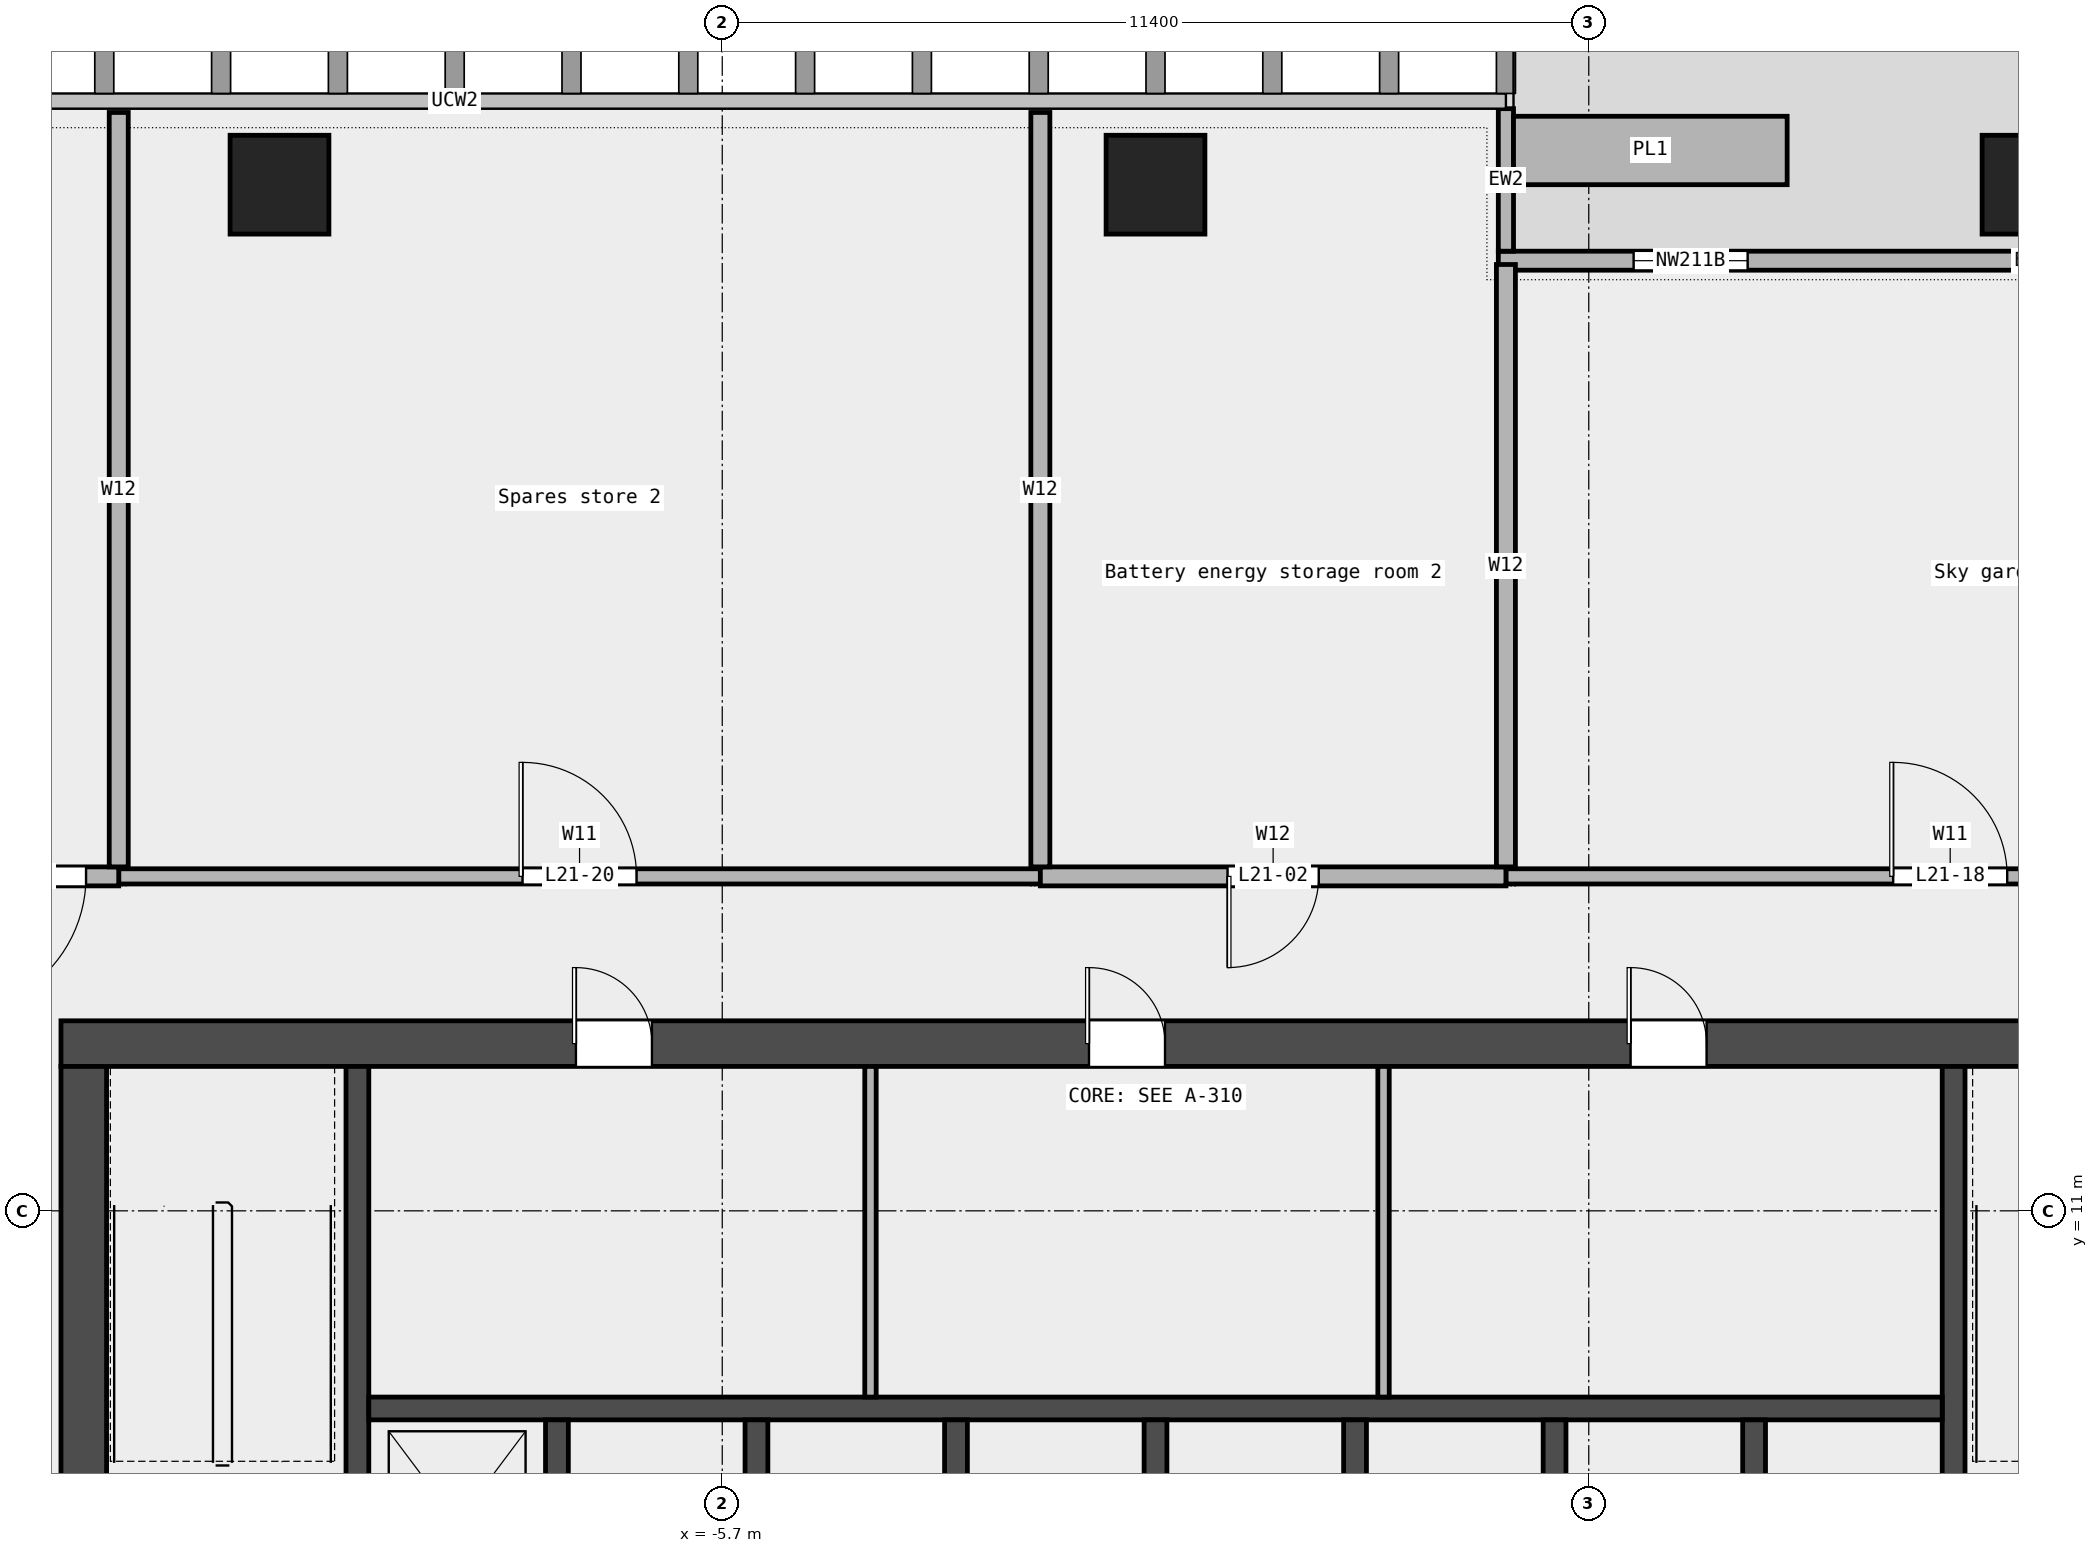
"""IFC4 building model, lengths in metres.
Left out: names, types, materials, properties, quantities, classifications, styles, units other than length and angle.
Written with IfcOpenShell. Run it as: python <this file> out.ifc"""

import sys

from ifc_helpers import new_model, si_unit, direction, frame, frame_2d, origin, origin_2d, place, context, subcontext, project, spatial, rectangle, extrude, element, fill, save


model = new_model("IFC4")
c1 = context("Model", 3, precision=1e-05, world=origin(), true_north=direction((0.0, 1.0)))
c2 = subcontext(c1, "Body", "Model", "MODEL_VIEW")
j1 = project(units=[si_unit("LENGTHUNIT", "METRE"), si_unit("PLANEANGLEUNIT", "RADIAN")], contexts=[c1])
p1 = place(None, origin())
s1 = spatial("IfcSite", under=j1, at=p1, CompositionType="ELEMENT")
p2 = place(p1, origin())
s2 = spatial("IfcBuilding", under=s1, at=p2, CompositionType="ELEMENT")
p3 = place(p2, frame((0.0, 0.0, 108.1)))
s3 = spatial("IfcBuildingStorey", under=s2, at=p3, CompositionType="ELEMENT", Elevation=108.1)
for number, where, z_axis, x_axis in (
    (1, (11.525, 24.5, 0.0), (0.0, 0.0, 1.0), (1.0, 0.0, 0.0)),
    (2, (0.0, 24.5, 0.0), (0.0, 0.0, 1.0), (1.0, 0.0, 0.0)),
    (3, (-11.525, 24.5, 0.0), (0.0, 0.0, 1.0), (1.0, 0.0, 0.0)),
):
    element("IfcColumn", number, at=place(p3, frame(where, z_axis=z_axis, x_axis=x_axis)), inside=s3, PredefinedType="COLUMN", context=c2, shape_type="SweptSolid", body=[
        extrude(rectangle(XDim=1.3, YDim=1.3, at=origin_2d()), origin(), (0.0, 0.0, 1.0), 4.05),
    ])
p4 = place(p3, frame((18.54, 23.5, 0.0), z_axis=(0.0, 0.0, 1.0), x_axis=(-1.0, 0.0, 0.0)))
e4 = element("IfcWall", 4, at=p4, inside=s3, PredefinedType="STANDARD", context=c2, shape_type="SweptSolid", body=[
    extrude(rectangle(XDim=14.03, YDim=0.25, at=frame_2d((7.015, 0.0))), origin(), (0.0, 0.0, 1.0), 4.05),
])
p5 = place(p4, frame((1.75, 0.0, 0.45)))
e5 = element("IfcOpeningElement", 5, at=p5, cuts=e4, PredefinedType="OPENING", context=c2, shape_type="SweptSolid", body=[
    extrude(rectangle(XDim=1.5, YDim=3.0, at=frame_2d((0.75, 1.5))), frame((0.0, 0.137, 0.0), z_axis=(0.0, -1.0, 0.0), x_axis=(1.0, 0.0, 0.0)), (0.0, 0.0, 1.0), 0.274),
])
p6 = place(p4, frame((4.25, 0.0, 0.0)))
e6 = element("IfcOpeningElement", 6, at=p6, cuts=e4, PredefinedType="OPENING", context=c2, shape_type="SweptSolid", body=[
    extrude(rectangle(XDim=1.8, YDim=2.4, at=frame_2d((0.9, 1.2))), frame((0.0, 0.137, 0.0), z_axis=(0.0, -1.0, 0.0), x_axis=(1.0, 0.0, 0.0)), (0.0, 0.0, 1.0), 0.274),
])
p7 = place(p4, frame((10.75, 0.0, 0.45)))
e7 = element("IfcOpeningElement", 7, at=p7, cuts=e4, PredefinedType="OPENING", context=c2, shape_type="SweptSolid", body=[
    extrude(rectangle(XDim=1.5, YDim=3.0, at=frame_2d((0.75, 1.5))), frame((0.0, 0.137, 0.0), z_axis=(0.0, -1.0, 0.0), x_axis=(1.0, 0.0, 0.0)), (0.0, 0.0, 1.0), 0.274),
])
p8 = place(p3, frame((4.61, 25.5, 0.0), z_axis=(0.0, 0.0, 1.0), x_axis=(0.0, -1.0, 0.0)))
e8 = element("IfcWall", 8, at=p8, inside=s3, PredefinedType="STANDARD", context=c2, shape_type="SweptSolid", body=[
    extrude(rectangle(XDim=1.875, YDim=0.2, at=frame_2d((0.938, 0.0))), origin(), (0.0, 0.0, 1.0), 4.05),
])
p9 = place(p3, frame((8.31, 24.95, 0.0), z_axis=(0.0, 0.0, 1.0), x_axis=(-1.0, 0.0, 0.0)))
e9 = element("IfcWall", 9, at=p9, inside=s3, PredefinedType="STANDARD", context=c2, shape_type="SweptSolid", body=[
    extrude(rectangle(XDim=3.6, YDim=0.9, at=frame_2d((1.8, 0.0))), origin(), (0.0, 0.0, 1.0), 0.7),
])
p10 = place(p3, frame((-13.64, 15.4, 0.0), z_axis=(0.0, 0.0, 1.0), x_axis=(1.0, 0.0, 0.0)))
e10 = element("IfcWall", 10, at=p10, inside=s3, PredefinedType="PARTITIONING", context=c2, shape_type="SweptSolid", body=[
    extrude(rectangle(XDim=12.125, YDim=0.2, at=frame_2d((6.062, 0.0))), origin(), (0.0, 0.0, 1.0), 4.05),
])
p11 = place(p10, frame((5.312, 0.0, 0.0)))
e11 = element("IfcOpeningElement", 11, at=p11, cuts=e10, PredefinedType="OPENING", context=c2, shape_type="SweptSolid", body=[
    extrude(rectangle(XDim=1.5, YDim=2.1, at=frame_2d((0.75, 1.05))), frame((0.0, 0.112, 0.0), z_axis=(0.0, -1.0, 0.0), x_axis=(1.0, 0.0, 0.0)), (0.0, 0.0, 1.0), 0.224),
])
p12 = place(p3, frame((4.61, 15.4, 0.0), z_axis=(0.0, 0.0, 1.0), x_axis=(1.0, 0.0, 0.0)))
e12 = element("IfcWall", 12, at=p12, inside=s3, PredefinedType="PARTITIONING", context=c2, shape_type="SweptSolid", body=[
    extrude(rectangle(XDim=11.69, YDim=0.2, at=frame_2d((5.845, 0.0))), origin(), (0.0, 0.0, 1.0), 4.05),
])
p13 = place(p12, frame((5.095, 0.0, 0.0)))
e13 = element("IfcOpeningElement", 13, at=p13, cuts=e12, PredefinedType="OPENING", context=c2, shape_type="SweptSolid", body=[
    extrude(rectangle(XDim=1.5, YDim=2.1, at=frame_2d((0.75, 1.05))), frame((0.0, 0.112, 0.0), z_axis=(0.0, -1.0, 0.0), x_axis=(1.0, 0.0, 0.0)), (0.0, 0.0, 1.0), 0.224),
])
p14 = place(p3, frame((-21.7, 15.4, 0.0), z_axis=(0.0, 0.0, 1.0), x_axis=(1.0, 0.0, 0.0)))
e14 = element("IfcWall", 14, at=p14, inside=s3, PredefinedType="PARTITIONING", context=c2, shape_type="SweptSolid", body=[
    extrude(rectangle(XDim=8.06, YDim=0.25, at=frame_2d((4.03, 0.0))), origin(), (0.0, 0.0, 1.0), 4.05),
])
p15 = place(p14, frame((5.83, 0.0, 0.0)))
e15 = element("IfcOpeningElement", 15, at=p15, cuts=e14, PredefinedType="OPENING", context=c2, shape_type="SweptSolid", body=[
    extrude(rectangle(XDim=1.8, YDim=2.1, at=frame_2d((0.9, 1.05))), frame((0.0, 0.137, 0.0), z_axis=(0.0, -1.0, 0.0), x_axis=(1.0, 0.0, 0.0)), (0.0, 0.0, 1.0), 0.274),
])
p16 = place(p3, frame((-1.515, 15.4, 0.0), z_axis=(0.0, 0.0, 1.0), x_axis=(1.0, 0.0, 0.0)))
e16 = element("IfcWall", 16, at=p16, inside=s3, PredefinedType="PARTITIONING", context=c2, shape_type="SweptSolid", body=[
    extrude(rectangle(XDim=6.125, YDim=0.25, at=frame_2d((3.062, 0.0))), origin(), (0.0, 0.0, 1.0), 4.05),
])
p17 = place(p16, frame((2.462, 0.0, 0.0)))
e17 = element("IfcOpeningElement", 17, at=p17, cuts=e16, PredefinedType="OPENING", context=c2, shape_type="SweptSolid", body=[
    extrude(rectangle(XDim=1.2, YDim=2.1, at=frame_2d((0.6, 1.05))), frame((0.0, 0.137, 0.0), z_axis=(0.0, -1.0, 0.0), x_axis=(1.0, 0.0, 0.0)), (0.0, 0.0, 1.0), 0.274),
])
for number, where, z_axis, x_axis in (
    (18, (-13.64, 15.525, 0.0), (0.0, 0.0, 1.0), (0.0, 1.0, 0.0)),
    (19, (-1.515, 15.525, 0.0), (0.0, 0.0, 1.0), (0.0, 1.0, 0.0)),
):
    element("IfcWall", number, at=place(p3, frame(where, z_axis=z_axis, x_axis=x_axis)), inside=s3, PredefinedType="PARTITIONING", context=c2, shape_type="SweptSolid", body=[
        extrude(rectangle(XDim=9.925, YDim=0.25, at=frame_2d((4.962, 0.0))), origin(), (0.0, 0.0, 1.0), 4.05),
    ])
p18 = place(p3, frame((4.61, 15.525, 0.0), z_axis=(0.0, 0.0, 1.0), x_axis=(0.0, 1.0, 0.0)))
e20 = element("IfcWall", 20, at=p18, inside=s3, PredefinedType="PARTITIONING", context=c2, shape_type="SweptSolid", body=[
    extrude(rectangle(XDim=7.925, YDim=0.25, at=frame_2d((3.962, 0.0))), origin(), (0.0, 0.0, 1.0), 4.05),
])
p19 = place(p3, frame((-14.4, 13.2, 0.0), z_axis=(0.0, 0.0, 1.0), x_axis=(1.0, 0.0, 0.0)))
e21 = element("IfcWall", 21, at=p19, inside=s3, PredefinedType="SHEAR", context=c2, shape_type="SweptSolid", body=[
    extrude(rectangle(XDim=28.8, YDim=0.6, at=frame_2d((14.4, 0.0))), origin(), (0.0, 0.0, 1.0), 4.2),
])
p20 = place(p19, frame((6.775, 0.0, 0.0)))
e22 = element("IfcOpeningElement", 22, at=p20, cuts=e21, PredefinedType="OPENING", context=c2, shape_type="SweptSolid", body=[
    extrude(rectangle(XDim=1.0, YDim=2.1, at=frame_2d((0.5, 1.05))), frame((0.0, 0.312, 0.0), z_axis=(0.0, -1.0, 0.0), x_axis=(1.0, 0.0, 0.0)), (0.0, 0.0, 1.0), 0.624),
])
p21 = place(p19, frame((13.525, 0.0, 0.0)))
e23 = element("IfcOpeningElement", 23, at=p21, cuts=e21, PredefinedType="OPENING", context=c2, shape_type="SweptSolid", body=[
    extrude(rectangle(XDim=1.0, YDim=2.1, at=frame_2d((0.5, 1.05))), frame((0.0, 0.312, 0.0), z_axis=(0.0, -1.0, 0.0), x_axis=(1.0, 0.0, 0.0)), (0.0, 0.0, 1.0), 0.624),
])
p22 = place(p19, frame((20.65, 0.0, 0.0)))
e24 = element("IfcOpeningElement", 24, at=p22, cuts=e21, PredefinedType="OPENING", context=c2, shape_type="SweptSolid", body=[
    extrude(rectangle(XDim=1.0, YDim=2.1, at=frame_2d((0.5, 1.05))), frame((0.0, 0.312, 0.0), z_axis=(0.0, -1.0, 0.0), x_axis=(1.0, 0.0, 0.0)), (0.0, 0.0, 1.0), 0.624),
])
p23 = place(p3, frame((-14.1, -6.6, 0.0), z_axis=(0.0, 0.0, 1.0), x_axis=(0.0, 1.0, 0.0)))
e25 = element("IfcWall", 25, at=p23, inside=s3, PredefinedType="SHEAR", context=c2, shape_type="SweptSolid", body=[
    extrude(rectangle(XDim=19.5, YDim=0.6, at=frame_2d((9.75, 0.0))), origin(), (0.0, 0.0, 1.0), 4.2),
])
p24 = place(p23, frame((9.3, 0.0, 0.0)))
e26 = element("IfcOpeningElement", 26, at=p24, cuts=e25, PredefinedType="OPENING", context=c2, shape_type="SweptSolid", body=[
    extrude(rectangle(XDim=1.8, YDim=2.1, at=frame_2d((0.9, 1.05))), frame((0.0, 0.312, 0.0), z_axis=(0.0, -1.0, 0.0), x_axis=(1.0, 0.0, 0.0)), (0.0, 0.0, 1.0), 0.624),
])
for number, where, z_axis, x_axis in (
    (27, (-10.5, 5.25, 0.0), (0.0, 0.0, 1.0), (0.0, 1.0, 0.0)),
    (28, (10.5, 5.25, 0.0), (0.0, 0.0, 1.0), (0.0, 1.0, 0.0)),
):
    element("IfcWall", number, at=place(p3, frame(where, z_axis=z_axis, x_axis=x_axis)), inside=s3, PredefinedType="SHEAR", context=c2, shape_type="SweptSolid", body=[
        extrude(rectangle(XDim=7.65, YDim=0.3, at=frame_2d((3.825, 0.0))), origin(), (0.0, 0.0, 1.0), 4.2),
    ])
p25 = place(p3, frame((-10.35, 8.4, 0.0), z_axis=(0.0, 0.0, 1.0), x_axis=(1.0, 0.0, 0.0)))
e29 = element("IfcWall", 29, at=p25, inside=s3, PredefinedType="SOLIDWALL", context=c2, shape_type="SweptSolid", body=[
    extrude(rectangle(XDim=20.7, YDim=0.3, at=frame_2d((10.35, 0.0))), origin(), (0.0, 0.0, 1.0), 4.2),
])
for number, where, z_axis, x_axis in (
    (30, (-7.875, 5.55, 0.0), (0.0, 0.0, 1.0), (0.0, 1.0, 0.0)),
    (31, (-5.25, 5.55, 0.0), (0.0, 0.0, 1.0), (0.0, 1.0, 0.0)),
    (32, (-2.625, 5.55, 0.0), (0.0, 0.0, 1.0), (0.0, 1.0, 0.0)),
    (33, (0.0, 5.55, 0.0), (0.0, 0.0, 1.0), (0.0, 1.0, 0.0)),
    (34, (2.625, 5.55, 0.0), (0.0, 0.0, 1.0), (0.0, 1.0, 0.0)),
    (35, (5.25, 5.55, 0.0), (0.0, 0.0, 1.0), (0.0, 1.0, 0.0)),
    (36, (7.875, 5.55, 0.0), (0.0, 0.0, 1.0), (0.0, 1.0, 0.0)),
):
    element("IfcWall", number, at=place(p3, frame(where, z_axis=z_axis, x_axis=x_axis)), inside=s3, PredefinedType="SOLIDWALL", context=c2, shape_type="SweptSolid", body=[
        extrude(rectangle(XDim=2.7, YDim=0.3, at=frame_2d((1.35, 0.0))), origin(), (0.0, 0.0, 1.0), 4.2),
    ])
for number, where, z_axis, x_axis in (
    (37, (-3.75, 8.55, 0.0), (0.0, 0.0, 1.0), (0.0, 1.0, 0.0)),
    (38, (3.0, 8.55, 0.0), (0.0, 0.0, 1.0), (0.0, 1.0, 0.0)),
):
    element("IfcWall", number, at=place(p3, frame(where, z_axis=z_axis, x_axis=x_axis)), inside=s3, PredefinedType="PARTITIONING", context=c2, shape_type="SweptSolid", body=[
        extrude(rectangle(XDim=4.35, YDim=0.15, at=frame_2d((2.175, 0.0))), origin(), (0.0, 0.0, 1.0), 4.2),
    ])
p26 = place(p7, origin())
e39 = element("IfcWindow", 39, at=p26, inside=s3, PartitioningType="SINGLE_PANEL", PredefinedType="WINDOW", context=c2, shape_type="SweptSolid", body=[
    extrude(rectangle(XDim=1.5, YDim=3.0, at=frame_2d((0.75, 1.5))), frame((0.0, 0.03, 0.0), z_axis=(0.0, -1.0, 0.0), x_axis=(1.0, 0.0, 0.0)), (0.0, 0.0, 1.0), 0.06),
])
fill(e7, e39)
p27 = place(p17, origin())
e40 = element("IfcDoor", 40, at=p27, inside=s3, OperationType="SINGLE_SWING_RIGHT", PredefinedType="DOOR", context=c2, shape_type="SweptSolid", body=[
    extrude(rectangle(XDim=1.2, YDim=2.1, at=frame_2d((0.6, 1.05))), frame((0.0, 0.025, 0.0), z_axis=(0.0, -1.0, 0.0), x_axis=(1.0, 0.0, 0.0)), (0.0, 0.0, 1.0), 0.05),
])
fill(e17, e40)
p28 = place(p15, origin())
e41 = element("IfcDoor", 41, at=p28, inside=s3, OperationType="DOUBLE_DOOR_SINGLE_SWING", PredefinedType="DOOR", context=c2, shape_type="SweptSolid", body=[
    extrude(rectangle(XDim=1.8, YDim=2.1, at=frame_2d((0.9, 1.05))), frame((0.0, 0.025, 0.0), z_axis=(0.0, -1.0, 0.0), x_axis=(1.0, 0.0, 0.0)), (0.0, 0.0, 1.0), 0.05),
])
fill(e15, e41)
p29 = place(p13, origin())
e42 = element("IfcDoor", 42, at=p29, inside=s3, OperationType="DOUBLE_DOOR_SINGLE_SWING", PredefinedType="DOOR", context=c2, shape_type="SweptSolid", body=[
    extrude(rectangle(XDim=1.5, YDim=2.1, at=frame_2d((0.75, 1.05))), frame((0.0, 0.025, 0.0), z_axis=(0.0, -1.0, 0.0), x_axis=(1.0, 0.0, 0.0)), (0.0, 0.0, 1.0), 0.05),
])
fill(e13, e42)
p30 = place(p11, origin())
e43 = element("IfcDoor", 43, at=p30, inside=s3, OperationType="DOUBLE_DOOR_SINGLE_SWING", PredefinedType="DOOR", context=c2, shape_type="SweptSolid", body=[
    extrude(rectangle(XDim=1.5, YDim=2.1, at=frame_2d((0.75, 1.05))), frame((0.0, 0.025, 0.0), z_axis=(0.0, -1.0, 0.0), x_axis=(1.0, 0.0, 0.0)), (0.0, 0.0, 1.0), 0.05),
])
fill(e11, e43)
p31 = place(p20, origin())
e44 = element("IfcDoor", 44, at=p31, inside=s3, OperationType="SINGLE_SWING_LEFT", PredefinedType="DOOR", context=c2, shape_type="SweptSolid", body=[
    extrude(rectangle(XDim=1.0, YDim=2.1, at=frame_2d((0.5, 1.05))), frame((0.0, 0.025, 0.0), z_axis=(0.0, -1.0, 0.0), x_axis=(1.0, 0.0, 0.0)), (0.0, 0.0, 1.0), 0.05),
])
fill(e22, e44)
p32 = place(p21, origin())
e45 = element("IfcDoor", 45, at=p32, inside=s3, OperationType="SINGLE_SWING_LEFT", PredefinedType="DOOR", context=c2, shape_type="SweptSolid", body=[
    extrude(rectangle(XDim=1.0, YDim=2.1, at=frame_2d((0.5, 1.05))), frame((0.0, 0.025, 0.0), z_axis=(0.0, -1.0, 0.0), x_axis=(1.0, 0.0, 0.0)), (0.0, 0.0, 1.0), 0.05),
])
fill(e23, e45)
p33 = place(p22, origin())
e46 = element("IfcDoor", 46, at=p33, inside=s3, OperationType="SINGLE_SWING_LEFT", PredefinedType="DOOR", context=c2, shape_type="SweptSolid", body=[
    extrude(rectangle(XDim=1.0, YDim=2.1, at=frame_2d((0.5, 1.05))), frame((0.0, 0.025, 0.0), z_axis=(0.0, -1.0, 0.0), x_axis=(1.0, 0.0, 0.0)), (0.0, 0.0, 1.0), 0.05),
])
fill(e24, e46)
save(model, sys.argv[1])
